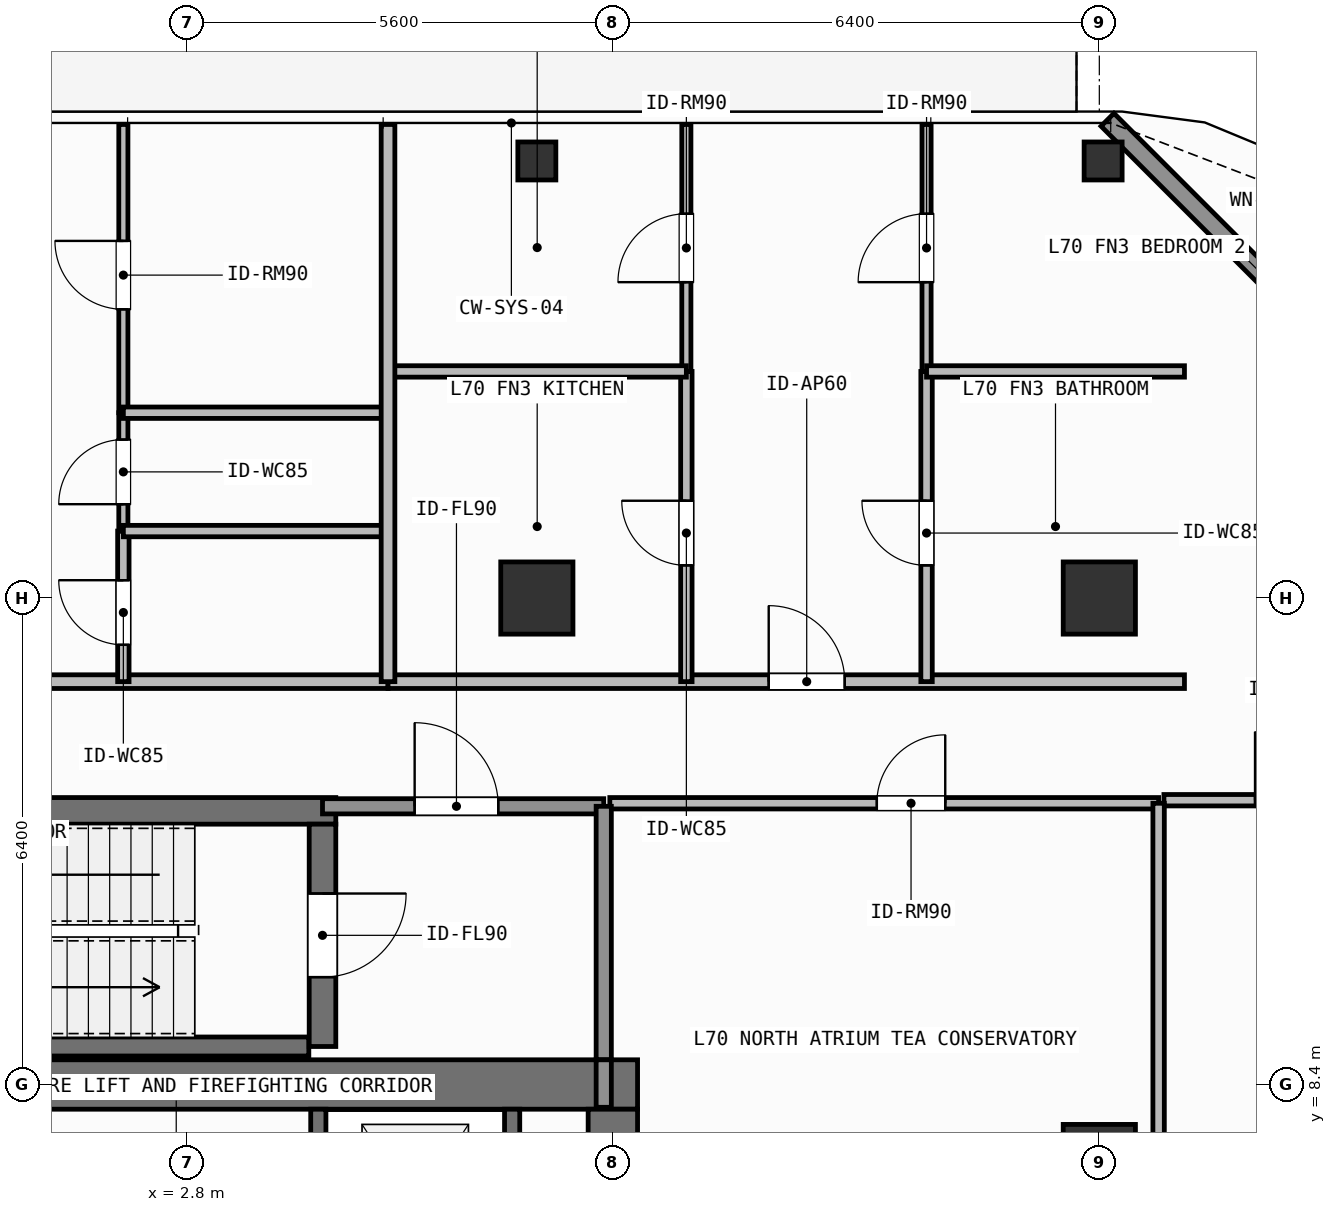
"""IFC4 building model, lengths in metres.
Left out: names, types, materials, properties, quantities, classifications, styles, units other than length and angle.
Written with IfcOpenShell. Run it as: python <this file> out.ifc"""

import sys

from ifc_helpers import new_model, si_unit, direction, frame, frame_2d, origin, origin_2d, place, context, subcontext, project, spatial, rectangle, hollow_rectangle, extrude, element, fill, save


model = new_model("IFC4")
c1 = context("Model", 3, precision=1e-05, world=origin(), true_north=direction((0.0, 1.0)))
c2 = subcontext(c1, "Body", "Model", "MODEL_VIEW")
j1 = project(units=[si_unit("LENGTHUNIT", "METRE"), si_unit("PLANEANGLEUNIT", "RADIAN")], contexts=[c1])
p1 = place(None, origin())
s1 = spatial("IfcSite", under=j1, at=p1, CompositionType="ELEMENT")
p2 = place(p1, origin())
s2 = spatial("IfcBuilding", under=s1, at=p2, CompositionType="ELEMENT")
p3 = place(p2, frame((0.0, 0.0, 285.9)))
s3 = spatial("IfcBuildingStorey", under=s2, at=p3, CompositionType="ELEMENT", Elevation=285.9)
p4 = place(p3, frame((-7.55, 8.4, 0.0), z_axis=(0.0, 0.0, 1.0), x_axis=(1.0, 0.0, 0.0)))
e1 = element("IfcWall", 1, at=p4, inside=s3, PredefinedType="SHEAR", context=c2, shape_type="SweptSolid", body=[
    extrude(rectangle(XDim=16.275, YDim=0.65, at=frame_2d((8.138, 0.0))), origin(), (0.0, 0.0, 1.0), 3.9),
])
p5 = place(p3, frame((8.4, 5.825, 0.0), z_axis=(0.0, 0.0, 1.0), x_axis=(0.0, 1.0, 0.0)))
e2 = element("IfcWall", 2, at=p5, inside=s3, PredefinedType="SHEAR", context=c2, shape_type="SweptSolid", body=[
    extrude(rectangle(XDim=2.25, YDim=0.65, at=frame_2d((1.125, 0.0))), origin(), (0.0, 0.0, 1.0), 3.9),
])
p6 = place(p3, frame((-2.555, 12.0, 0.0), z_axis=(0.0, 0.0, 1.0), x_axis=(1.0, 0.0, 0.0)))
e3 = element("IfcWall", 3, at=p6, inside=s3, PredefinedType="SHEAR", context=c2, shape_type="SweptSolid", body=[
    extrude(rectangle(XDim=7.31, YDim=0.35, at=frame_2d((3.655, 0.0))), origin(), (0.0, 0.0, 1.0), 3.9),
])
p7 = place(p3, frame((-2.2, 8.9, 0.0), z_axis=(0.0, 0.0, 1.0), x_axis=(1.0, 0.0, 0.0)))
e4 = element("IfcWall", 4, at=p7, inside=s3, PredefinedType="SHEAR", context=c2, shape_type="SweptSolid", body=[
    extrude(rectangle(XDim=6.6, YDim=0.25, at=frame_2d((3.3, 0.0))), origin(), (0.0, 0.0, 1.0), 3.9),
])
p8 = place(p3, frame((4.58, 11.825, 0.0), z_axis=(0.0, 0.0, 1.0), x_axis=(0.0, -1.0, 0.0)))
e5 = element("IfcWall", 5, at=p8, inside=s3, PredefinedType="SHEAR", context=c2, shape_type="SweptSolid", body=[
    extrude(rectangle(XDim=2.925, YDim=0.35, at=frame_2d((1.462, 0.0))), origin(), (0.0, 0.0, 1.0), 3.9),
])
p9 = place(p8, frame((0.913, 0.0, 0.0)))
e6 = element("IfcOpeningElement", 6, at=p9, cuts=e5, PredefinedType="OPENING", context=c2, shape_type="SweptSolid", body=[
    extrude(rectangle(XDim=1.1, YDim=2.15, at=frame_2d((0.55, 1.075))), frame((0.0, 0.185, 0.0), z_axis=(0.0, -1.0, 0.0), x_axis=(1.0, 0.0, 0.0)), (0.0, 0.0, 1.0), 0.37),
])
for number, where, z_axis, x_axis in (
    (7, (7.4, 14.8, 0.0), (0.0, 0.0, 1.0), (1.0, 0.0, 0.0)),
    (8, (14.8, 14.8, 0.0), (0.0, 0.0, 1.0), (1.0, 0.0, 0.0)),
    (9, (14.8, 7.4, 0.0), (0.0, 0.0, 1.0), (1.0, 0.0, 0.0)),
):
    element("IfcColumn", number, at=place(p3, frame(where, z_axis=z_axis, x_axis=x_axis)), inside=s3, PredefinedType="COLUMN", context=c2, shape_type="SweptSolid", body=[
        extrude(rectangle(XDim=0.95, YDim=0.95, at=origin_2d()), origin(), (0.0, 0.0, 1.0), 3.9),
    ])
for number, where, z_axis, x_axis in (
    (10, (14.85, 20.55, 0.0), (0.0, 0.0, 1.0), (1.0, 0.0, 0.0)),
    (11, (7.4, 20.55, 0.0), (0.0, 0.0, 1.0), (1.0, 0.0, 0.0)),
):
    element("IfcColumn", number, at=place(p3, frame(where, z_axis=z_axis, x_axis=x_axis)), inside=s3, PredefinedType="COLUMN", context=c2, shape_type="SweptSolid", body=[
        extrude(hollow_rectangle(XDim=0.5, YDim=0.5, WallThickness=0.025, at=origin_2d()), origin(), (0.0, 0.0, 1.0), 3.9),
    ])
p10 = place(p3, frame((14.908, 21.092, 0.0), z_axis=(0.0, 0.0, 1.0), x_axis=(0.707106781187, -0.707106781187, 0.0)))
e12 = element("IfcWall", 12, at=p10, inside=s3, PredefinedType="SOLIDWALL", context=c2, shape_type="SweptSolid", body=[
    extrude(rectangle(XDim=6.059, YDim=0.24, at=frame_2d((3.03, 0.0))), origin(), (0.0, 0.0, 1.0), 3.68),
])
p11 = place(p10, frame((2.28, 0.0, 0.8)))
e13 = element("IfcOpeningElement", 13, at=p11, cuts=e12, PredefinedType="OPENING", context=c2, shape_type="SweptSolid", body=[
    extrude(rectangle(XDim=1.5, YDim=1.85, at=frame_2d((0.75, 0.925))), frame((0.0, 0.13, 0.0), z_axis=(0.0, -1.0, 0.0), x_axis=(1.0, 0.0, 0.0)), (0.0, 0.0, 1.0), 0.26),
])
p12 = place(p3, frame((4.525, 5.825, 0.0), z_axis=(0.0, 0.0, 1.0), x_axis=(0.0, 1.0, 0.0)))
e14 = element("IfcWall", 14, at=p12, inside=s3, PredefinedType="SHEAR", context=c2, shape_type="SweptSolid", body=[
    extrude(rectangle(XDim=2.25, YDim=0.2, at=frame_2d((1.125, 0.0))), origin(), (0.0, 0.0, 1.0), 3.68),
])
p13 = place(p12, frame((0.425, 0.0, 0.0)))
e15 = element("IfcOpeningElement", 15, at=p13, cuts=e14, PredefinedType="OPENING", context=c2, shape_type="SweptSolid", body=[
    extrude(rectangle(XDim=1.1, YDim=2.2, at=frame_2d((0.55, 1.1))), frame((0.0, 0.11, 0.0), z_axis=(0.0, -1.0, 0.0), x_axis=(1.0, 0.0, 0.0)), (0.0, 0.0, 1.0), 0.22),
])
p14 = place(p3, frame((7.075, 5.825, 0.0), z_axis=(0.0, 0.0, 1.0), x_axis=(0.0, 1.0, 0.0)))
e16 = element("IfcWall", 16, at=p14, inside=s3, PredefinedType="SHEAR", context=c2, shape_type="SweptSolid", body=[
    extrude(rectangle(XDim=2.25, YDim=0.2, at=frame_2d((1.125, 0.0))), origin(), (0.0, 0.0, 1.0), 3.68),
])
p15 = place(p3, frame((4.58, 12.06, 0.0), z_axis=(0.0, 0.0, 1.0), x_axis=(1.0, 0.0, 0.0)))
e17 = element("IfcWall", 17, at=p15, inside=s3, PredefinedType="SOLIDWALL", context=c2, shape_type="SweptSolid", body=[
    extrude(rectangle(XDim=3.7, YDim=0.2, at=frame_2d((1.85, 0.0))), origin(), (0.0, 0.0, 1.0), 3.68),
])
p16 = place(p15, frame((1.212, 0.0, 0.0)))
e18 = element("IfcOpeningElement", 18, at=p16, cuts=e17, PredefinedType="OPENING", context=c2, shape_type="SweptSolid", body=[
    extrude(rectangle(XDim=1.1, YDim=2.15, at=frame_2d((0.55, 1.075))), frame((0.0, 0.11, 0.0), z_axis=(0.0, -1.0, 0.0), x_axis=(1.0, 0.0, 0.0)), (0.0, 0.0, 1.0), 0.22),
])
p17 = place(p3, frame((8.36, 12.1, 0.0), z_axis=(0.0, 0.0, 1.0), x_axis=(1.0, 0.0, 0.0)))
e19 = element("IfcWall", 19, at=p17, inside=s3, PredefinedType="PARTITIONING", context=c2, shape_type="SweptSolid", body=[
    extrude(rectangle(XDim=7.22, YDim=0.15, at=frame_2d((3.61, 0.0))), origin(), (0.0, 0.0, 1.0), 3.68),
])
p18 = place(p17, frame((3.513, 0.0, 0.0)))
e20 = element("IfcOpeningElement", 20, at=p18, cuts=e19, PredefinedType="OPENING", context=c2, shape_type="SweptSolid", body=[
    extrude(rectangle(XDim=0.9, YDim=2.1, at=frame_2d((0.45, 1.05))), frame((0.0, 0.085, 0.0), z_axis=(0.0, -1.0, 0.0), x_axis=(1.0, 0.0, 0.0)), (0.0, 0.0, 1.0), 0.17),
])
p19 = place(p3, frame((-10.393, 13.7, 0.0), z_axis=(0.0, 0.0, 1.0), x_axis=(1.0, 0.0, 0.0)))
e21 = element("IfcWall", 21, at=p19, inside=s3, PredefinedType="PARTITIONING", context=c2, shape_type="SweptSolid", body=[
    extrude(rectangle(XDim=15.835, YDim=0.18, at=frame_2d((7.917, 0.0))), origin(), (0.0, 0.0, 1.0), 3.68),
])
p20 = place(p19, frame((8.224, 0.0, 0.0)))
e22 = element("IfcOpeningElement", 22, at=p20, cuts=e21, PredefinedType="OPENING", context=c2, shape_type="SweptSolid", body=[
    extrude(rectangle(XDim=1.0, YDim=2.2, at=frame_2d((0.5, 1.1))), frame((0.0, 0.1, 0.0), z_axis=(0.0, -1.0, 0.0), x_axis=(1.0, 0.0, 0.0)), (0.0, 0.0, 1.0), 0.2),
])
p21 = place(p3, frame((1.96, 13.7, 0.0), z_axis=(0.0, 0.0, 1.0), x_axis=(0.0, 1.0, 0.0)))
e23 = element("IfcWall", 23, at=p21, inside=s3, PredefinedType="PARTITIONING", context=c2, shape_type="SweptSolid", body=[
    extrude(rectangle(XDim=1.981, YDim=0.15, at=frame_2d((0.99, 0.0))), origin(), (0.0, 0.0, 1.0), 3.68),
])
p22 = place(p21, frame((0.484, 0.0, 0.0)))
e24 = element("IfcOpeningElement", 24, at=p22, cuts=e23, PredefinedType="OPENING", context=c2, shape_type="SweptSolid", body=[
    extrude(rectangle(XDim=0.85, YDim=2.1, at=frame_2d((0.425, 1.05))), frame((0.0, 0.085, 0.0), z_axis=(0.0, -1.0, 0.0), x_axis=(1.0, 0.0, 0.0)), (0.0, 0.0, 1.0), 0.17),
])
p23 = place(p3, frame((1.96, 15.681, 0.0), z_axis=(0.0, 0.0, 1.0), x_axis=(0.0, 1.0, 0.0)))
e25 = element("IfcWall", 25, at=p23, inside=s3, PredefinedType="PARTITIONING", context=c2, shape_type="SweptSolid", body=[
    extrude(rectangle(XDim=1.557, YDim=0.12, at=frame_2d((0.779, 0.0))), origin(), (0.0, 0.0, 1.0), 3.68),
])
p24 = place(p23, frame((0.354, 0.0, 0.0)))
e26 = element("IfcOpeningElement", 26, at=p24, cuts=e25, PredefinedType="OPENING", context=c2, shape_type="SweptSolid", body=[
    extrude(rectangle(XDim=0.85, YDim=2.1, at=frame_2d((0.425, 1.05))), frame((0.0, 0.07, 0.0), z_axis=(0.0, -1.0, 0.0), x_axis=(1.0, 0.0, 0.0)), (0.0, 0.0, 1.0), 0.14),
])
p25 = place(p3, frame((1.96, 17.238, 0.0), z_axis=(0.0, 0.0, 1.0), x_axis=(0.0, 1.0, 0.0)))
e27 = element("IfcWall", 27, at=p25, inside=s3, PredefinedType="PARTITIONING", context=c2, shape_type="SweptSolid", body=[
    extrude(rectangle(XDim=3.792, YDim=0.12, at=frame_2d((1.896, 0.0))), origin(), (0.0, 0.0, 1.0), 3.68),
])
p26 = place(p25, frame((1.36, 0.0, 0.0)))
e28 = element("IfcOpeningElement", 28, at=p26, cuts=e27, PredefinedType="OPENING", context=c2, shape_type="SweptSolid", body=[
    extrude(rectangle(XDim=0.9, YDim=2.1, at=frame_2d((0.45, 1.05))), frame((0.0, 0.07, 0.0), z_axis=(0.0, -1.0, 0.0), x_axis=(1.0, 0.0, 0.0)), (0.0, 0.0, 1.0), 0.14),
])
p27 = place(p3, frame((5.442, 13.7, 0.0), z_axis=(0.0, 0.0, 1.0), x_axis=(1.0, 0.0, 0.0)))
e29 = element("IfcWall", 29, at=p27, inside=s3, PredefinedType="PARTITIONING", context=c2, shape_type="SweptSolid", body=[
    extrude(rectangle(XDim=10.478, YDim=0.18, at=frame_2d((5.239, 0.0))), origin(), (0.0, 0.0, 1.0), 3.68),
])
p28 = place(p27, frame((5.008, 0.0, 0.0)))
e30 = element("IfcOpeningElement", 30, at=p28, cuts=e29, PredefinedType="OPENING", context=c2, shape_type="SweptSolid", body=[
    extrude(rectangle(XDim=1.0, YDim=2.2, at=frame_2d((0.5, 1.1))), frame((0.0, 0.1, 0.0), z_axis=(0.0, -1.0, 0.0), x_axis=(1.0, 0.0, 0.0)), (0.0, 0.0, 1.0), 0.2),
])
p29 = place(p3, frame((9.367, 13.7, 0.0), z_axis=(0.0, 0.0, 1.0), x_axis=(0.0, 1.0, 0.0)))
e31 = element("IfcWall", 31, at=p29, inside=s3, PredefinedType="PARTITIONING", context=c2, shape_type="SweptSolid", body=[
    extrude(rectangle(XDim=4.081, YDim=0.15, at=frame_2d((2.041, 0.0))), origin(), (0.0, 0.0, 1.0), 3.68),
])
p30 = place(p29, frame((1.53, 0.0, 0.0)))
e32 = element("IfcOpeningElement", 32, at=p30, cuts=e31, PredefinedType="OPENING", context=c2, shape_type="SweptSolid", body=[
    extrude(rectangle(XDim=0.85, YDim=2.1, at=frame_2d((0.425, 1.05))), frame((0.0, 0.085, 0.0), z_axis=(0.0, -1.0, 0.0), x_axis=(1.0, 0.0, 0.0)), (0.0, 0.0, 1.0), 0.17),
])
p31 = place(p3, frame((9.367, 17.781, 0.0), z_axis=(0.0, 0.0, 1.0), x_axis=(0.0, 1.0, 0.0)))
e33 = element("IfcWall", 33, at=p31, inside=s3, PredefinedType="PARTITIONING", context=c2, shape_type="SweptSolid", body=[
    extrude(rectangle(XDim=3.249, YDim=0.12, at=frame_2d((1.625, 0.0))), origin(), (0.0, 0.0, 1.0), 3.68),
])
p32 = place(p31, frame((1.175, 0.0, 0.0)))
e34 = element("IfcOpeningElement", 34, at=p32, cuts=e33, PredefinedType="OPENING", context=c2, shape_type="SweptSolid", body=[
    extrude(rectangle(XDim=0.9, YDim=2.1, at=frame_2d((0.45, 1.05))), frame((0.0, 0.07, 0.0), z_axis=(0.0, -1.0, 0.0), x_axis=(1.0, 0.0, 0.0)), (0.0, 0.0, 1.0), 0.14),
])
p33 = place(p3, frame((12.527, 13.7, 0.0), z_axis=(0.0, 0.0, 1.0), x_axis=(0.0, 1.0, 0.0)))
e35 = element("IfcWall", 35, at=p33, inside=s3, PredefinedType="PARTITIONING", context=c2, shape_type="SweptSolid", body=[
    extrude(rectangle(XDim=4.081, YDim=0.15, at=frame_2d((2.041, 0.0))), origin(), (0.0, 0.0, 1.0), 3.68),
])
p34 = place(p33, frame((1.53, 0.0, 0.0)))
e36 = element("IfcOpeningElement", 36, at=p34, cuts=e35, PredefinedType="OPENING", context=c2, shape_type="SweptSolid", body=[
    extrude(rectangle(XDim=0.85, YDim=2.1, at=frame_2d((0.425, 1.05))), frame((0.0, 0.085, 0.0), z_axis=(0.0, -1.0, 0.0), x_axis=(1.0, 0.0, 0.0)), (0.0, 0.0, 1.0), 0.17),
])
p35 = place(p3, frame((12.527, 17.781, 0.0), z_axis=(0.0, 0.0, 1.0), x_axis=(0.0, 1.0, 0.0)))
e37 = element("IfcWall", 37, at=p35, inside=s3, PredefinedType="PARTITIONING", context=c2, shape_type="SweptSolid", body=[
    extrude(rectangle(XDim=3.249, YDim=0.12, at=frame_2d((1.625, 0.0))), origin(), (0.0, 0.0, 1.0), 3.68),
])
p36 = place(p35, frame((1.175, 0.0, 0.0)))
e38 = element("IfcOpeningElement", 38, at=p36, cuts=e37, PredefinedType="OPENING", context=c2, shape_type="SweptSolid", body=[
    extrude(rectangle(XDim=0.9, YDim=2.1, at=frame_2d((0.45, 1.05))), frame((0.0, 0.07, 0.0), z_axis=(0.0, -1.0, 0.0), x_axis=(1.0, 0.0, 0.0)), (0.0, 0.0, 1.0), 0.14),
])
p37 = place(p3, frame((15.65, 12.14, 0.0), z_axis=(0.0, 0.0, 1.0), x_axis=(1.0, 0.0, 0.0)))
e39 = element("IfcWall", 39, at=p37, inside=s3, PredefinedType="PARTITIONING", context=c2, shape_type="SweptSolid", body=[
    extrude(rectangle(XDim=3.47, YDim=0.15, at=frame_2d((1.735, 0.0))), origin(), (0.0, 0.0, 1.0), 3.68),
])
p38 = place(p37, frame((1.198, 0.0, 0.0)))
e40 = element("IfcOpeningElement", 40, at=p38, cuts=e39, PredefinedType="OPENING", context=c2, shape_type="SweptSolid", body=[
    extrude(rectangle(XDim=0.9, YDim=2.1, at=frame_2d((0.45, 1.05))), frame((0.0, 0.085, 0.0), z_axis=(0.0, -1.0, 0.0), x_axis=(1.0, 0.0, 0.0)), (0.0, 0.0, 1.0), 0.17),
])
p39 = place(p3, frame((8.28, 8.725, 0.0), z_axis=(0.0, 0.0, 1.0), x_axis=(0.0, 1.0, 0.0)))
e41 = element("IfcWall", 41, at=p39, inside=s3, PredefinedType="SOLIDWALL", context=c2, shape_type="SweptSolid", body=[
    extrude(rectangle(XDim=3.335, YDim=0.2, at=frame_2d((1.667, 0.0))), origin(), (0.0, 0.0, 1.0), 3.68),
])
p40 = place(p3, frame((8.28, 8.1, 0.0), z_axis=(0.0, 0.0, 1.0), x_axis=(0.0, 1.0, 0.0)))
e42 = element("IfcWall", 42, at=p40, inside=s3, PredefinedType="SOLIDWALL", context=c2, shape_type="SweptSolid", body=[
    extrude(rectangle(XDim=0.625, YDim=0.2, at=frame_2d((0.312, 0.0))), origin(), (0.0, 0.0, 1.0), 3.68),
])
p41 = place(p3, frame((15.58, 5.85, 0.0), z_axis=(0.0, 0.0, 1.0), x_axis=(0.0, 1.0, 0.0)))
e43 = element("IfcWall", 43, at=p41, inside=s3, PredefinedType="PARTITIONING", context=c2, shape_type="SweptSolid", body=[
    extrude(rectangle(XDim=6.25, YDim=0.15, at=frame_2d((3.125, 0.0))), origin(), (0.0, 0.0, 1.0), 3.68),
])
for number, where, z_axis, x_axis in (
    (44, (1.96, 15.681, 0.0), (0.0, 0.0, 1.0), (1.0, 0.0, 0.0)),
    (45, (1.96, 17.238, 0.0), (0.0, 0.0, 1.0), (1.0, 0.0, 0.0)),
):
    element("IfcWall", number, at=place(p3, frame(where, z_axis=z_axis, x_axis=x_axis)), inside=s3, PredefinedType="PARTITIONING", context=c2, shape_type="SweptSolid", body=[
        extrude(rectangle(XDim=3.482, YDim=0.15, at=frame_2d((1.741, 0.0))), origin(), (0.0, 0.0, 1.0), 3.68),
    ])
p42 = place(p3, frame((5.442, 17.781, 0.0), z_axis=(0.0, 0.0, 1.0), x_axis=(1.0, 0.0, 0.0)))
e46 = element("IfcWall", 46, at=p42, inside=s3, PredefinedType="PARTITIONING", context=c2, shape_type="SweptSolid", body=[
    extrude(rectangle(XDim=3.925, YDim=0.15, at=frame_2d((1.962, 0.0))), origin(), (0.0, 0.0, 1.0), 3.68),
])
p43 = place(p3, frame((12.527, 17.781, 0.0), z_axis=(0.0, 0.0, 1.0), x_axis=(1.0, 0.0, 0.0)))
e47 = element("IfcWall", 47, at=p43, inside=s3, PredefinedType="PARTITIONING", context=c2, shape_type="SweptSolid", body=[
    extrude(rectangle(XDim=3.393, YDim=0.15, at=frame_2d((1.696, 0.0))), origin(), (0.0, 0.0, 1.0), 3.68),
])
p44 = place(p3, frame((5.442, 13.7, 0.0), z_axis=(0.0, 0.0, 1.0), x_axis=(0.0, 1.0, 0.0)))
e48 = element("IfcWall", 48, at=p44, inside=s3, PredefinedType="PARTITIONING", context=c2, shape_type="SweptSolid", body=[
    extrude(rectangle(XDim=7.33, YDim=0.18, at=frame_2d((3.665, 0.0))), origin(), (0.0, 0.0, 1.0), 3.68),
])
p45 = place(p11, origin())
e49 = element("IfcWindow", 49, at=p45, inside=s3, PartitioningType="SINGLE_PANEL", PredefinedType="WINDOW", context=c2, shape_type="SweptSolid", body=[
    extrude(rectangle(XDim=1.5, YDim=1.85, at=frame_2d((0.75, 0.925))), frame((0.0, 0.03, 0.0), z_axis=(0.0, -1.0, 0.0), x_axis=(1.0, 0.0, 0.0)), (0.0, 0.0, 1.0), 0.06),
])
fill(e13, e49)
p46 = place(p9, origin())
e50 = element("IfcDoor", 50, at=p46, inside=s3, OperationType="SINGLE_SWING_LEFT", PredefinedType="DOOR", context=c2, shape_type="SweptSolid", body=[
    extrude(rectangle(XDim=1.1, YDim=2.15, at=frame_2d((0.55, 1.075))), frame((0.0, 0.025, 0.0), z_axis=(0.0, -1.0, 0.0), x_axis=(1.0, 0.0, 0.0)), (0.0, 0.0, 1.0), 0.05),
])
fill(e6, e50)
p47 = place(p16, origin())
e51 = element("IfcDoor", 51, at=p47, inside=s3, OperationType="SINGLE_SWING_LEFT", PredefinedType="DOOR", context=c2, shape_type="SweptSolid", body=[
    extrude(rectangle(XDim=1.1, YDim=2.15, at=frame_2d((0.55, 1.075))), frame((0.0, 0.025, 0.0), z_axis=(0.0, -1.0, 0.0), x_axis=(1.0, 0.0, 0.0)), (0.0, 0.0, 1.0), 0.05),
])
fill(e18, e51)
p48 = place(p18, origin())
e52 = element("IfcDoor", 52, at=p48, inside=s3, OperationType="SINGLE_SWING_RIGHT", PredefinedType="DOOR", context=c2, shape_type="SweptSolid", body=[
    extrude(rectangle(XDim=0.9, YDim=2.1, at=frame_2d((0.45, 1.05))), frame((0.0, 0.025, 0.0), z_axis=(0.0, -1.0, 0.0), x_axis=(1.0, 0.0, 0.0)), (0.0, 0.0, 1.0), 0.05),
])
fill(e20, e52)
p49 = place(p22, origin())
e53 = element("IfcDoor", 53, at=p49, inside=s3, OperationType="SINGLE_SWING_RIGHT", PredefinedType="DOOR", context=c2, shape_type="SweptSolid", body=[
    extrude(rectangle(XDim=0.85, YDim=2.1, at=frame_2d((0.425, 1.05))), frame((0.0, 0.025, 0.0), z_axis=(0.0, -1.0, 0.0), x_axis=(1.0, 0.0, 0.0)), (0.0, 0.0, 1.0), 0.05),
])
fill(e24, e53)
p50 = place(p24, origin())
e54 = element("IfcDoor", 54, at=p50, inside=s3, OperationType="SINGLE_SWING_LEFT", PredefinedType="DOOR", context=c2, shape_type="SweptSolid", body=[
    extrude(rectangle(XDim=0.85, YDim=2.1, at=frame_2d((0.425, 1.05))), frame((0.0, 0.025, 0.0), z_axis=(0.0, -1.0, 0.0), x_axis=(1.0, 0.0, 0.0)), (0.0, 0.0, 1.0), 0.05),
])
fill(e26, e54)
p51 = place(p26, origin())
e55 = element("IfcDoor", 55, at=p51, inside=s3, OperationType="SINGLE_SWING_RIGHT", PredefinedType="DOOR", context=c2, shape_type="SweptSolid", body=[
    extrude(rectangle(XDim=0.9, YDim=2.1, at=frame_2d((0.45, 1.05))), frame((0.0, 0.025, 0.0), z_axis=(0.0, -1.0, 0.0), x_axis=(1.0, 0.0, 0.0)), (0.0, 0.0, 1.0), 0.05),
])
fill(e28, e55)
p52 = place(p28, origin())
e56 = element("IfcDoor", 56, at=p52, inside=s3, OperationType="SINGLE_SWING_LEFT", PredefinedType="DOOR", context=c2, shape_type="SweptSolid", body=[
    extrude(rectangle(XDim=1.0, YDim=2.2, at=frame_2d((0.5, 1.1))), frame((0.0, 0.025, 0.0), z_axis=(0.0, -1.0, 0.0), x_axis=(1.0, 0.0, 0.0)), (0.0, 0.0, 1.0), 0.05),
])
fill(e30, e56)
p53 = place(p30, origin())
e57 = element("IfcDoor", 57, at=p53, inside=s3, OperationType="SINGLE_SWING_RIGHT", PredefinedType="DOOR", context=c2, shape_type="SweptSolid", body=[
    extrude(rectangle(XDim=0.85, YDim=2.1, at=frame_2d((0.425, 1.05))), frame((0.0, 0.025, 0.0), z_axis=(0.0, -1.0, 0.0), x_axis=(1.0, 0.0, 0.0)), (0.0, 0.0, 1.0), 0.05),
])
fill(e32, e57)
p54 = place(p32, origin())
e58 = element("IfcDoor", 58, at=p54, inside=s3, OperationType="SINGLE_SWING_LEFT", PredefinedType="DOOR", context=c2, shape_type="SweptSolid", body=[
    extrude(rectangle(XDim=0.9, YDim=2.1, at=frame_2d((0.45, 1.05))), frame((0.0, 0.025, 0.0), z_axis=(0.0, -1.0, 0.0), x_axis=(1.0, 0.0, 0.0)), (0.0, 0.0, 1.0), 0.05),
])
fill(e34, e58)
p55 = place(p34, origin())
e59 = element("IfcDoor", 59, at=p55, inside=s3, OperationType="SINGLE_SWING_RIGHT", PredefinedType="DOOR", context=c2, shape_type="SweptSolid", body=[
    extrude(rectangle(XDim=0.85, YDim=2.1, at=frame_2d((0.425, 1.05))), frame((0.0, 0.025, 0.0), z_axis=(0.0, -1.0, 0.0), x_axis=(1.0, 0.0, 0.0)), (0.0, 0.0, 1.0), 0.05),
])
fill(e36, e59)
p56 = place(p36, origin())
e60 = element("IfcDoor", 60, at=p56, inside=s3, OperationType="SINGLE_SWING_LEFT", PredefinedType="DOOR", context=c2, shape_type="SweptSolid", body=[
    extrude(rectangle(XDim=0.9, YDim=2.1, at=frame_2d((0.45, 1.05))), frame((0.0, 0.025, 0.0), z_axis=(0.0, -1.0, 0.0), x_axis=(1.0, 0.0, 0.0)), (0.0, 0.0, 1.0), 0.05),
])
fill(e38, e60)
p57 = place(p38, origin())
e61 = element("IfcDoor", 61, at=p57, inside=s3, OperationType="SINGLE_SWING_LEFT", PredefinedType="DOOR", context=c2, shape_type="SweptSolid", body=[
    extrude(rectangle(XDim=0.9, YDim=2.1, at=frame_2d((0.45, 1.05))), frame((0.0, 0.025, 0.0), z_axis=(0.0, -1.0, 0.0), x_axis=(1.0, 0.0, 0.0)), (0.0, 0.0, 1.0), 0.05),
])
fill(e40, e61)
save(model, sys.argv[1])
